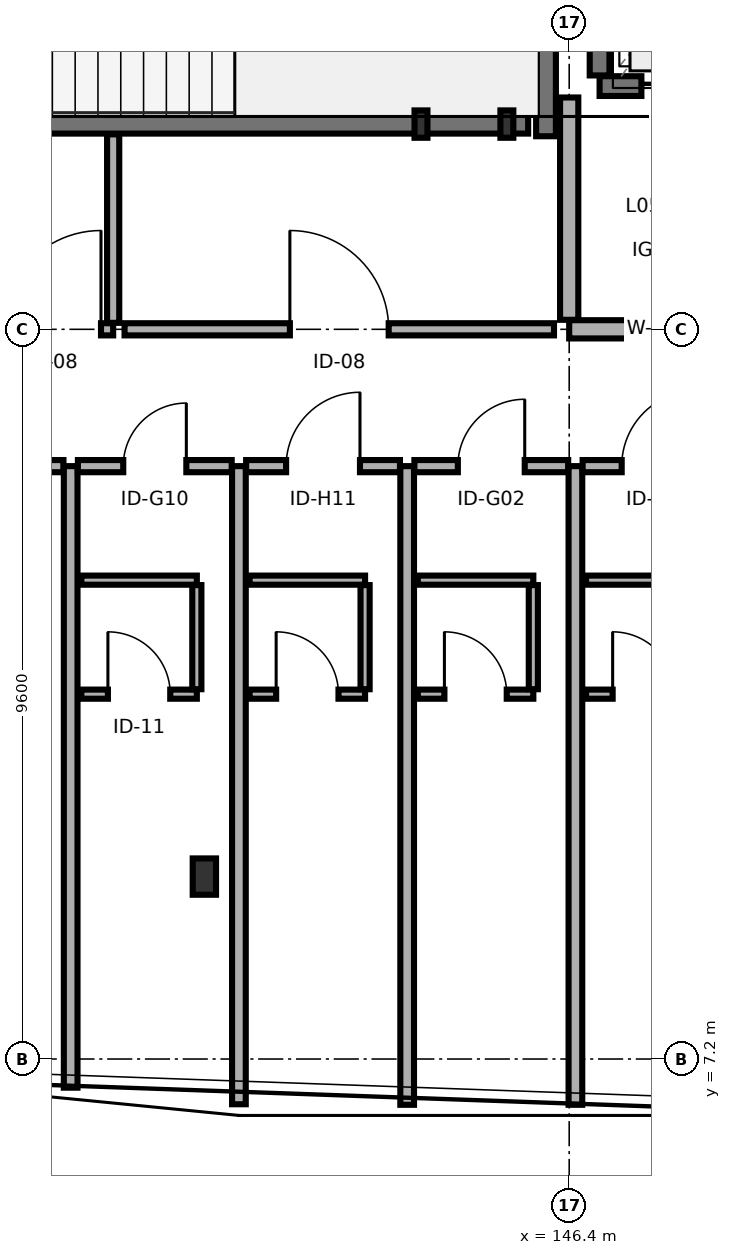
"""IFC4 building model, lengths in metres.
Left out: names, types, materials, properties, quantities, classifications, styles, units other than length and angle.
Written with IfcOpenShell. Run it as: python <this file> out.ifc"""

import sys

from ifc_helpers import new_model, si_unit, direction, frame, frame_2d, origin, origin_2d, place, context, subcontext, project, spatial, rectangle, i_section, extrude, element, fill, save


model = new_model("IFC4")
c1 = context("Model", 3, precision=1e-05, world=origin(), true_north=direction((0.0, 1.0)))
c2 = subcontext(c1, "Body", "Model", "MODEL_VIEW")
j1 = project(units=[si_unit("LENGTHUNIT", "METRE"), si_unit("PLANEANGLEUNIT", "RADIAN")], contexts=[c1])
p1 = place(None, origin())
s1 = spatial("IfcSite", under=j1, at=p1, CompositionType="ELEMENT")
p2 = place(p1, origin())
s2 = spatial("IfcBuilding", under=s1, at=p2, CompositionType="ELEMENT")
p3 = place(p2, frame((0.0, 0.0, 18.1)))
s3 = spatial("IfcBuildingStorey", under=s2, at=p3, CompositionType="ELEMENT", Elevation=18.1)
for number, where, z_axis, x_axis in (
    (1, (144.45, 19.5, 0.0), (0.0, 0.0, 1.0), (1.0, 0.0, 0.0)),
    (2, (145.58, 19.5, 0.0), (0.0, 0.0, 1.0), (1.0, 0.0, 0.0)),
):
    element("IfcColumn", number, at=place(p3, frame(where, z_axis=z_axis, x_axis=x_axis)), inside=s3, PredefinedType="PILASTER", context=c2, shape_type="SweptSolid", body=[
        extrude(i_section(OverallWidth=0.17, OverallDepth=0.36, WebThickness=0.008, FlangeThickness=0.013, FilletRadius=0.018, at=origin_2d()), origin(), (0.0, 0.0, 1.0), 3.4),
    ])
p4 = place(p3, frame((141.6, 9.6, 0.0), z_axis=(0.0, 0.0, 1.0), x_axis=(1.0, 0.0, 0.0)))
e3 = element("IfcColumn", 3, at=p4, inside=s3, PredefinedType="COLUMN", context=c2, shape_type="SweptSolid", body=[
    extrude(i_section(OverallWidth=0.307, OverallDepth=0.478, WebThickness=0.021, FlangeThickness=0.04, FilletRadius=0.027, at=origin_2d()), origin(), (0.0, 0.0, 1.0), 3.4),
])
p5 = place(p3, frame((146.095, 19.34, 0.0), z_axis=(0.0, 0.0, 1.0), x_axis=(0.0, 1.0, 0.0)))
e4 = element("IfcWall", 4, at=p5, inside=s3, PredefinedType="SHEAR", context=c2, shape_type="SweptSolid", body=[
    extrude(rectangle(XDim=4.27, YDim=0.26, at=frame_2d((2.135, 0.0))), origin(), (0.0, 0.0, 1.0), 3.21),
])
p6 = place(p3, frame((137.34, 19.505, 0.0), z_axis=(0.0, 0.0, 1.0), x_axis=(1.0, 0.0, 0.0)))
e5 = element("IfcWall", 5, at=p6, inside=s3, PredefinedType="SHEAR", context=c2, shape_type="SweptSolid", body=[
    extrude(rectangle(XDim=8.52, YDim=0.26, at=frame_2d((4.26, 0.0))), origin(), (0.0, 0.0, 1.0), 3.21),
])
p7 = place(p3, frame((146.8, 20.0, 0.0), z_axis=(0.0, 0.0, 1.0), x_axis=(1.0, 0.0, 0.0)))
e6 = element("IfcWall", 6, at=p7, inside=s3, PredefinedType="SHEAR", context=c2, shape_type="SweptSolid", body=[
    extrude(rectangle(XDim=2.4, YDim=0.26, at=frame_2d((1.2, 0.0))), origin(), (0.0, 0.0, 1.0), 3.21),
])
p8 = place(p7, frame((0.55, 0.0, 0.0)))
e7 = element("IfcOpeningElement", 7, at=p8, cuts=e6, PredefinedType="OPENING", context=c2, shape_type="SweptSolid", body=[
    extrude(rectangle(XDim=1.3, YDim=2.25, at=frame_2d((0.65, 1.125))), frame((0.0, 0.14, 0.0), z_axis=(0.0, -1.0, 0.0), x_axis=(1.0, 0.0, 0.0)), (0.0, 0.0, 1.0), 0.28),
])
p9 = place(p3, frame((146.8, 20.14, 0.0), z_axis=(0.0, 0.0, 1.0), x_axis=(0.0, 1.0, 0.0)))
e8 = element("IfcWall", 8, at=p9, inside=s3, PredefinedType="SHEAR", context=c2, shape_type="SweptSolid", body=[
    extrude(rectangle(XDim=2.52, YDim=0.26, at=frame_2d((1.26, 0.0))), origin(), (0.0, 0.0, 1.0), 3.21),
])
p10 = place(p3, frame((146.4, 16.8, 0.0), z_axis=(0.0, 0.0, 1.0), x_axis=(1.0, 0.0, 0.0)))
e9 = element("IfcWall", 9, at=p10, inside=s3, PredefinedType="SOLIDWALL", context=c2, shape_type="SweptSolid", body=[
    extrude(rectangle(XDim=7.0, YDim=0.24, at=frame_2d((3.5, 0.0))), origin(), (0.0, 0.0, 1.0), 2.745),
])
p11 = place(p10, frame((2.7, 0.0, 0.0)))
e10 = element("IfcOpeningElement", 10, at=p11, cuts=e9, PredefinedType="OPENING", context=c2, shape_type="SweptSolid", body=[
    extrude(rectangle(XDim=1.6, YDim=2.2, at=frame_2d((0.8, 1.1))), frame((0.0, 0.13, 0.0), z_axis=(0.0, -1.0, 0.0), x_axis=(1.0, 0.0, 0.0)), (0.0, 0.0, 1.0), 0.26),
])
p12 = place(p3, frame((146.4, 16.925, 0.0), z_axis=(0.0, 0.0, 1.0), x_axis=(0.0, 1.0, 0.0)))
e11 = element("IfcWall", 11, at=p12, inside=s3, PredefinedType="SOLIDWALL", context=c2, shape_type="SweptSolid", body=[
    extrude(rectangle(XDim=2.925, YDim=0.24, at=frame_2d((1.462, 0.0))), origin(), (0.0, 0.0, 1.0), 2.745),
])
p13 = place(p3, frame((135.0, 16.8, 0.0), z_axis=(0.0, 0.0, 1.0), x_axis=(1.0, 0.0, 0.0)))
e12 = element("IfcWall", 12, at=p13, inside=s3, PredefinedType="PARTITIONING", context=c2, shape_type="SweptSolid", body=[
    extrude(rectangle(XDim=5.4, YDim=0.16, at=frame_2d((2.7, 0.0))), origin(), (0.0, 0.0, 1.0), 2.745),
])
p14 = place(p13, frame((3.94, 0.0, 0.0)))
e13 = element("IfcOpeningElement", 13, at=p14, cuts=e12, PredefinedType="OPENING", context=c2, shape_type="SweptSolid", body=[
    extrude(rectangle(XDim=1.3, YDim=2.2, at=frame_2d((0.65, 1.1))), frame((0.0, 0.09, 0.0), z_axis=(0.0, -1.0, 0.0), x_axis=(1.0, 0.0, 0.0)), (0.0, 0.0, 1.0), 0.18),
])
p15 = place(p3, frame((140.4, 16.885, 0.0), z_axis=(0.0, 0.0, 1.0), x_axis=(0.0, 1.0, 0.0)))
e14 = element("IfcWall", 14, at=p15, inside=s3, PredefinedType="PARTITIONING", context=c2, shape_type="SweptSolid", body=[
    extrude(rectangle(XDim=2.48, YDim=0.16, at=frame_2d((1.24, 0.0))), origin(), (0.0, 0.0, 1.0), 2.745),
])
p16 = place(p3, frame((140.55, 16.8, 0.0), z_axis=(0.0, 0.0, 1.0), x_axis=(1.0, 0.0, 0.0)))
e15 = element("IfcWall", 15, at=p16, inside=s3, PredefinedType="PARTITIONING", context=c2, shape_type="SweptSolid", body=[
    extrude(rectangle(XDim=5.65, YDim=0.16, at=frame_2d((2.825, 0.0))), origin(), (0.0, 0.0, 1.0), 2.745),
])
p17 = place(p16, frame((2.175, 0.0, 0.0)))
e16 = element("IfcOpeningElement", 16, at=p17, cuts=e15, PredefinedType="OPENING", context=c2, shape_type="SweptSolid", body=[
    extrude(rectangle(XDim=1.3, YDim=2.2, at=frame_2d((0.65, 1.1))), frame((0.0, 0.09, 0.0), z_axis=(0.0, -1.0, 0.0), x_axis=(1.0, 0.0, 0.0)), (0.0, 0.0, 1.0), 0.18),
])
p18 = place(p3, frame((137.722, 15.0, 0.0), z_axis=(0.0, 0.0, 1.0), x_axis=(1.0, 0.0, 0.0)))
e17 = element("IfcWall", 17, at=p18, inside=s3, PredefinedType="PARTITIONING", context=c2, shape_type="SweptSolid", body=[
    extrude(rectangle(XDim=2.023, YDim=0.16, at=frame_2d((1.012, 0.0))), origin(), (0.0, 0.0, 1.0), 3.21),
])
p19 = place(p18, frame((0.538, 0.0, 0.0)))
e18 = element("IfcOpeningElement", 18, at=p19, cuts=e17, PredefinedType="OPENING", context=c2, shape_type="SweptSolid", body=[
    extrude(rectangle(XDim=0.948, YDim=2.1, at=frame_2d((0.474, 1.05))), frame((0.0, 0.09, 0.0), z_axis=(0.0, -1.0, 0.0), x_axis=(1.0, 0.0, 0.0)), (0.0, 0.0, 1.0), 0.18),
])
p20 = place(p3, frame((139.841, 6.823, 0.0), z_axis=(0.0, 0.0, 1.0), x_axis=(0.0, 1.0, 0.0)))
e19 = element("IfcWall", 19, at=p20, inside=s3, PredefinedType="PARTITIONING", context=c2, shape_type="SweptSolid", body=[
    extrude(rectangle(XDim=8.177, YDim=0.18, at=frame_2d((4.089, 0.0))), origin(), (0.0, 0.0, 1.0), 2.755),
])
p21 = place(p3, frame((139.936, 15.0, 0.0), z_axis=(0.0, 0.0, 1.0), x_axis=(1.0, 0.0, 0.0)))
e20 = element("IfcWall", 20, at=p21, inside=s3, PredefinedType="PARTITIONING", context=c2, shape_type="SweptSolid", body=[
    extrude(rectangle(XDim=2.024, YDim=0.16, at=frame_2d((1.012, 0.0))), origin(), (0.0, 0.0, 1.0), 2.745),
])
p22 = place(p21, frame((0.597, 0.0, 0.0)))
e21 = element("IfcOpeningElement", 21, at=p22, cuts=e20, PredefinedType="OPENING", context=c2, shape_type="SweptSolid", body=[
    extrude(rectangle(XDim=0.83, YDim=2.11, at=frame_2d((0.415, 1.055))), frame((0.0, 0.09, 0.0), z_axis=(0.0, -1.0, 0.0), x_axis=(1.0, 0.0, 0.0)), (0.0, 0.0, 1.0), 0.18),
])
p23 = place(p3, frame((139.981, 12.0, 0.0), z_axis=(0.0, 0.0, 1.0), x_axis=(1.0, 0.0, 0.0)))
e22 = element("IfcWall", 22, at=p23, inside=s3, PredefinedType="PARTITIONING", context=c2, shape_type="SweptSolid", body=[
    extrude(rectangle(XDim=1.52, YDim=0.12, at=frame_2d((0.76, 0.0))), origin(), (0.0, 0.0, 1.0), 2.745),
])
p24 = place(p23, frame((0.35, 0.0, 0.0)))
e23 = element("IfcOpeningElement", 23, at=p24, cuts=e22, PredefinedType="OPENING", context=c2, shape_type="SweptSolid", body=[
    extrude(rectangle(XDim=0.82, YDim=2.08, at=frame_2d((0.41, 1.04))), frame((0.0, 0.07, 0.0), z_axis=(0.0, -1.0, 0.0), x_axis=(1.0, 0.0, 0.0)), (0.0, 0.0, 1.0), 0.14),
])
p25 = place(p3, frame((139.981, 13.5, 0.0), z_axis=(0.0, 0.0, 1.0), x_axis=(1.0, 0.0, 0.0)))
e24 = element("IfcWall", 24, at=p25, inside=s3, PredefinedType="PARTITIONING", context=c2, shape_type="SweptSolid", body=[
    extrude(rectangle(XDim=1.52, YDim=0.12, at=frame_2d((0.76, 0.0))), origin(), (0.0, 0.0, 1.0), 2.745),
])
p26 = place(p3, frame((141.501, 12.065, 0.0), z_axis=(0.0, 0.0, 1.0), x_axis=(0.0, 1.0, 0.0)))
e25 = element("IfcWall", 25, at=p26, inside=s3, PredefinedType="PARTITIONING", context=c2, shape_type="SweptSolid", body=[
    extrude(rectangle(XDim=1.37, YDim=0.12, at=frame_2d((0.685, 0.0))), origin(), (0.0, 0.0, 1.0), 2.745),
])
p27 = place(p3, frame((142.054, 6.605, 0.0), z_axis=(0.0, 0.0, 1.0), x_axis=(0.0, 1.0, 0.0)))
e26 = element("IfcWall", 26, at=p27, inside=s3, PredefinedType="PARTITIONING", context=c2, shape_type="SweptSolid", body=[
    extrude(rectangle(XDim=8.395, YDim=0.18, at=frame_2d((4.198, 0.0))), origin(), (0.0, 0.0, 1.0), 2.755),
])
p28 = place(p3, frame((142.149, 15.0, 0.0), z_axis=(0.0, 0.0, 1.0), x_axis=(1.0, 0.0, 0.0)))
e27 = element("IfcWall", 27, at=p28, inside=s3, PredefinedType="PARTITIONING", context=c2, shape_type="SweptSolid", body=[
    extrude(rectangle(XDim=2.024, YDim=0.16, at=frame_2d((1.012, 0.0))), origin(), (0.0, 0.0, 1.0), 3.21),
])
p29 = place(p28, frame((0.526, 0.0, 0.0)))
e28 = element("IfcOpeningElement", 28, at=p29, cuts=e27, PredefinedType="OPENING", context=c2, shape_type="SweptSolid", body=[
    extrude(rectangle(XDim=0.972, YDim=2.16, at=frame_2d((0.486, 1.08))), frame((0.0, 0.09, 0.0), z_axis=(0.0, -1.0, 0.0), x_axis=(1.0, 0.0, 0.0)), (0.0, 0.0, 1.0), 0.18),
])
p30 = place(p3, frame((142.195, 12.0, 0.0), z_axis=(0.0, 0.0, 1.0), x_axis=(1.0, 0.0, 0.0)))
e29 = element("IfcWall", 29, at=p30, inside=s3, PredefinedType="PARTITIONING", context=c2, shape_type="SweptSolid", body=[
    extrude(rectangle(XDim=1.52, YDim=0.12, at=frame_2d((0.76, 0.0))), origin(), (0.0, 0.0, 1.0), 3.21),
])
p31 = place(p30, frame((0.35, 0.0, 0.0)))
e30 = element("IfcOpeningElement", 30, at=p31, cuts=e29, PredefinedType="OPENING", context=c2, shape_type="SweptSolid", body=[
    extrude(rectangle(XDim=0.82, YDim=2.08, at=frame_2d((0.41, 1.04))), frame((0.0, 0.07, 0.0), z_axis=(0.0, -1.0, 0.0), x_axis=(1.0, 0.0, 0.0)), (0.0, 0.0, 1.0), 0.14),
])
p32 = place(p3, frame((142.195, 13.5, 0.0), z_axis=(0.0, 0.0, 1.0), x_axis=(1.0, 0.0, 0.0)))
e31 = element("IfcWall", 31, at=p32, inside=s3, PredefinedType="PARTITIONING", context=c2, shape_type="SweptSolid", body=[
    extrude(rectangle(XDim=1.52, YDim=0.12, at=frame_2d((0.76, 0.0))), origin(), (0.0, 0.0, 1.0), 3.21),
])
p33 = place(p3, frame((143.715, 12.065, 0.0), z_axis=(0.0, 0.0, 1.0), x_axis=(0.0, 1.0, 0.0)))
e32 = element("IfcWall", 32, at=p33, inside=s3, PredefinedType="PARTITIONING", context=c2, shape_type="SweptSolid", body=[
    extrude(rectangle(XDim=1.37, YDim=0.12, at=frame_2d((0.685, 0.0))), origin(), (0.0, 0.0, 1.0), 3.21),
])
p34 = place(p3, frame((144.268, 6.597, 0.0), z_axis=(0.0, 0.0, 1.0), x_axis=(0.0, 1.0, 0.0)))
e33 = element("IfcWall", 33, at=p34, inside=s3, PredefinedType="PARTITIONING", context=c2, shape_type="SweptSolid", body=[
    extrude(rectangle(XDim=8.403, YDim=0.18, at=frame_2d((4.201, 0.0))), origin(), (0.0, 0.0, 1.0), 2.755),
])
p35 = place(p3, frame((144.363, 15.0, 0.0), z_axis=(0.0, 0.0, 1.0), x_axis=(1.0, 0.0, 0.0)))
e34 = element("IfcWall", 34, at=p35, inside=s3, PredefinedType="PARTITIONING", context=c2, shape_type="SweptSolid", body=[
    extrude(rectangle(XDim=2.023, YDim=0.16, at=frame_2d((1.012, 0.0))), origin(), (0.0, 0.0, 1.0), 3.21),
])
p36 = place(p35, frame((0.572, 0.0, 0.0)))
e35 = element("IfcOpeningElement", 35, at=p36, cuts=e34, PredefinedType="OPENING", context=c2, shape_type="SweptSolid", body=[
    extrude(rectangle(XDim=0.88, YDim=2.05, at=frame_2d((0.44, 1.025))), frame((0.0, 0.09, 0.0), z_axis=(0.0, -1.0, 0.0), x_axis=(1.0, 0.0, 0.0)), (0.0, 0.0, 1.0), 0.18),
])
p37 = place(p3, frame((144.408, 12.0, 0.0), z_axis=(0.0, 0.0, 1.0), x_axis=(1.0, 0.0, 0.0)))
e36 = element("IfcWall", 36, at=p37, inside=s3, PredefinedType="PARTITIONING", context=c2, shape_type="SweptSolid", body=[
    extrude(rectangle(XDim=1.52, YDim=0.12, at=frame_2d((0.76, 0.0))), origin(), (0.0, 0.0, 1.0), 3.21),
])
p38 = place(p37, frame((0.35, 0.0, 0.0)))
e37 = element("IfcOpeningElement", 37, at=p38, cuts=e36, PredefinedType="OPENING", context=c2, shape_type="SweptSolid", body=[
    extrude(rectangle(XDim=0.82, YDim=2.08, at=frame_2d((0.41, 1.04))), frame((0.0, 0.07, 0.0), z_axis=(0.0, -1.0, 0.0), x_axis=(1.0, 0.0, 0.0)), (0.0, 0.0, 1.0), 0.14),
])
p39 = place(p3, frame((144.408, 13.5, 0.0), z_axis=(0.0, 0.0, 1.0), x_axis=(1.0, 0.0, 0.0)))
e38 = element("IfcWall", 38, at=p39, inside=s3, PredefinedType="PARTITIONING", context=c2, shape_type="SweptSolid", body=[
    extrude(rectangle(XDim=1.52, YDim=0.12, at=frame_2d((0.76, 0.0))), origin(), (0.0, 0.0, 1.0), 3.21),
])
p40 = place(p3, frame((145.928, 12.065, 0.0), z_axis=(0.0, 0.0, 1.0), x_axis=(0.0, 1.0, 0.0)))
e39 = element("IfcWall", 39, at=p40, inside=s3, PredefinedType="PARTITIONING", context=c2, shape_type="SweptSolid", body=[
    extrude(rectangle(XDim=1.37, YDim=0.12, at=frame_2d((0.685, 0.0))), origin(), (0.0, 0.0, 1.0), 3.21),
])
p41 = place(p3, frame((146.482, 6.597, 0.0), z_axis=(0.0, 0.0, 1.0), x_axis=(0.0, 1.0, 0.0)))
e40 = element("IfcWall", 40, at=p41, inside=s3, PredefinedType="PARTITIONING", context=c2, shape_type="SweptSolid", body=[
    extrude(rectangle(XDim=8.403, YDim=0.18, at=frame_2d((4.201, 0.0))), origin(), (0.0, 0.0, 1.0), 2.755),
])
p42 = place(p3, frame((146.577, 15.0, 0.0), z_axis=(0.0, 0.0, 1.0), x_axis=(1.0, 0.0, 0.0)))
e41 = element("IfcWall", 41, at=p42, inside=s3, PredefinedType="PARTITIONING", context=c2, shape_type="SweptSolid", body=[
    extrude(rectangle(XDim=2.024, YDim=0.16, at=frame_2d((1.012, 0.0))), origin(), (0.0, 0.0, 1.0), 3.21),
])
p43 = place(p42, frame((0.514, 0.0, 0.0)))
e42 = element("IfcOpeningElement", 42, at=p43, cuts=e41, PredefinedType="OPENING", context=c2, shape_type="SweptSolid", body=[
    extrude(rectangle(XDim=0.996, YDim=2.1, at=frame_2d((0.498, 1.05))), frame((0.0, 0.09, 0.0), z_axis=(0.0, -1.0, 0.0), x_axis=(1.0, 0.0, 0.0)), (0.0, 0.0, 1.0), 0.18),
])
p44 = place(p3, frame((146.622, 12.0, 0.0), z_axis=(0.0, 0.0, 1.0), x_axis=(1.0, 0.0, 0.0)))
e43 = element("IfcWall", 43, at=p44, inside=s3, PredefinedType="PARTITIONING", context=c2, shape_type="SweptSolid", body=[
    extrude(rectangle(XDim=1.52, YDim=0.12, at=frame_2d((0.76, 0.0))), origin(), (0.0, 0.0, 1.0), 3.21),
])
p45 = place(p44, frame((0.35, 0.0, 0.0)))
e44 = element("IfcOpeningElement", 44, at=p45, cuts=e43, PredefinedType="OPENING", context=c2, shape_type="SweptSolid", body=[
    extrude(rectangle(XDim=0.82, YDim=2.08, at=frame_2d((0.41, 1.04))), frame((0.0, 0.07, 0.0), z_axis=(0.0, -1.0, 0.0), x_axis=(1.0, 0.0, 0.0)), (0.0, 0.0, 1.0), 0.14),
])
p46 = place(p3, frame((146.622, 13.5, 0.0), z_axis=(0.0, 0.0, 1.0), x_axis=(1.0, 0.0, 0.0)))
e45 = element("IfcWall", 45, at=p46, inside=s3, PredefinedType="PARTITIONING", context=c2, shape_type="SweptSolid", body=[
    extrude(rectangle(XDim=1.52, YDim=0.12, at=frame_2d((0.76, 0.0))), origin(), (0.0, 0.0, 1.0), 3.21),
])
p47 = place(p8, origin())
e46 = element("IfcDoor", 46, at=p47, inside=s3, OperationType="SLIDING_TO_RIGHT", PredefinedType="DOOR", context=c2, shape_type="SweptSolid", body=[
    extrude(rectangle(XDim=1.3, YDim=2.25, at=frame_2d((0.65, 1.125))), frame((0.0, 0.025, 0.0), z_axis=(0.0, -1.0, 0.0), x_axis=(1.0, 0.0, 0.0)), (0.0, 0.0, 1.0), 0.05),
])
fill(e7, e46)
p48 = place(p14, origin())
e47 = element("IfcDoor", 47, at=p48, inside=s3, OperationType="SINGLE_SWING_RIGHT", PredefinedType="DOOR", context=c2, shape_type="SweptSolid", body=[
    extrude(rectangle(XDim=1.3, YDim=2.2, at=frame_2d((0.65, 1.1))), frame((0.0, 0.025, 0.0), z_axis=(0.0, -1.0, 0.0), x_axis=(1.0, 0.0, 0.0)), (0.0, 0.0, 1.0), 0.05),
])
fill(e13, e47)
p49 = place(p17, origin())
e48 = element("IfcDoor", 48, at=p49, inside=s3, OperationType="SINGLE_SWING_LEFT", PredefinedType="DOOR", context=c2, shape_type="SweptSolid", body=[
    extrude(rectangle(XDim=1.3, YDim=2.2, at=frame_2d((0.65, 1.1))), frame((0.0, 0.025, 0.0), z_axis=(0.0, -1.0, 0.0), x_axis=(1.0, 0.0, 0.0)), (0.0, 0.0, 1.0), 0.05),
])
fill(e16, e48)
p50 = place(p22, origin())
e49 = element("IfcDoor", 49, at=p50, inside=s3, OperationType="SINGLE_SWING_RIGHT", PredefinedType="DOOR", context=c2, shape_type="SweptSolid", body=[
    extrude(rectangle(XDim=0.83, YDim=2.11, at=frame_2d((0.415, 1.055))), frame((0.0, 0.025, 0.0), z_axis=(0.0, -1.0, 0.0), x_axis=(1.0, 0.0, 0.0)), (0.0, 0.0, 1.0), 0.05),
])
fill(e21, e49)
p51 = place(p24, origin())
e50 = element("IfcDoor", 50, at=p51, inside=s3, OperationType="SINGLE_SWING_LEFT", PredefinedType="DOOR", context=c2, shape_type="SweptSolid", body=[
    extrude(rectangle(XDim=0.82, YDim=2.08, at=frame_2d((0.41, 1.04))), frame((0.0, 0.025, 0.0), z_axis=(0.0, -1.0, 0.0), x_axis=(1.0, 0.0, 0.0)), (0.0, 0.0, 1.0), 0.05),
])
fill(e23, e50)
p52 = place(p29, origin())
e51 = element("IfcDoor", 51, at=p52, inside=s3, OperationType="SINGLE_SWING_RIGHT", PredefinedType="DOOR", context=c2, shape_type="SweptSolid", body=[
    extrude(rectangle(XDim=0.972, YDim=2.16, at=frame_2d((0.486, 1.08))), frame((0.0, 0.025, 0.0), z_axis=(0.0, -1.0, 0.0), x_axis=(1.0, 0.0, 0.0)), (0.0, 0.0, 1.0), 0.05),
])
fill(e28, e51)
p53 = place(p31, origin())
e52 = element("IfcDoor", 52, at=p53, inside=s3, OperationType="SINGLE_SWING_LEFT", PredefinedType="DOOR", context=c2, shape_type="SweptSolid", body=[
    extrude(rectangle(XDim=0.82, YDim=2.08, at=frame_2d((0.41, 1.04))), frame((0.0, 0.025, 0.0), z_axis=(0.0, -1.0, 0.0), x_axis=(1.0, 0.0, 0.0)), (0.0, 0.0, 1.0), 0.05),
])
fill(e30, e52)
p54 = place(p36, origin())
e53 = element("IfcDoor", 53, at=p54, inside=s3, OperationType="SINGLE_SWING_RIGHT", PredefinedType="DOOR", context=c2, shape_type="SweptSolid", body=[
    extrude(rectangle(XDim=0.88, YDim=2.05, at=frame_2d((0.44, 1.025))), frame((0.0, 0.025, 0.0), z_axis=(0.0, -1.0, 0.0), x_axis=(1.0, 0.0, 0.0)), (0.0, 0.0, 1.0), 0.05),
])
fill(e35, e53)
p55 = place(p38, origin())
e54 = element("IfcDoor", 54, at=p55, inside=s3, OperationType="SINGLE_SWING_LEFT", PredefinedType="DOOR", context=c2, shape_type="SweptSolid", body=[
    extrude(rectangle(XDim=0.82, YDim=2.08, at=frame_2d((0.41, 1.04))), frame((0.0, 0.025, 0.0), z_axis=(0.0, -1.0, 0.0), x_axis=(1.0, 0.0, 0.0)), (0.0, 0.0, 1.0), 0.05),
])
fill(e37, e54)
p56 = place(p43, origin())
e55 = element("IfcDoor", 55, at=p56, inside=s3, OperationType="SINGLE_SWING_RIGHT", PredefinedType="DOOR", context=c2, shape_type="SweptSolid", body=[
    extrude(rectangle(XDim=0.996, YDim=2.1, at=frame_2d((0.498, 1.05))), frame((0.0, 0.025, 0.0), z_axis=(0.0, -1.0, 0.0), x_axis=(1.0, 0.0, 0.0)), (0.0, 0.0, 1.0), 0.05),
])
fill(e42, e55)
p57 = place(p45, origin())
e56 = element("IfcDoor", 56, at=p57, inside=s3, OperationType="SINGLE_SWING_LEFT", PredefinedType="DOOR", context=c2, shape_type="SweptSolid", body=[
    extrude(rectangle(XDim=0.82, YDim=2.08, at=frame_2d((0.41, 1.04))), frame((0.0, 0.025, 0.0), z_axis=(0.0, -1.0, 0.0), x_axis=(1.0, 0.0, 0.0)), (0.0, 0.0, 1.0), 0.05),
])
fill(e44, e56)
save(model, sys.argv[1])
